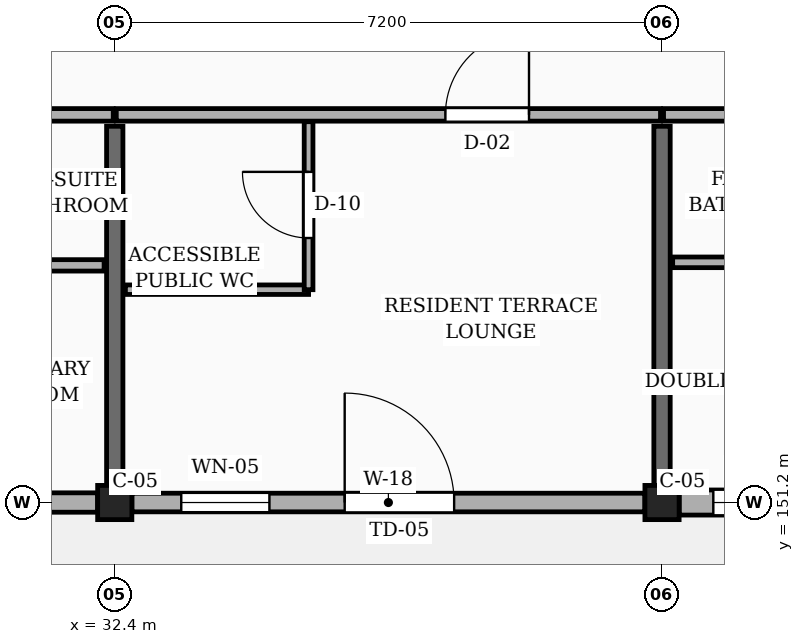
"""IFC4 building model, lengths in metres.
Left out: names, types, materials, properties, quantities, classifications, styles, units other than length and angle.
Written with IfcOpenShell. Run it as: python <this file> out.ifc"""

import sys

from ifc_helpers import new_model, si_unit, direction, frame, frame_2d, origin, origin_2d, place, context, subcontext, project, spatial, rectangle, extrude, element, fill, save


model = new_model("IFC4")
c1 = context("Model", 3, precision=1e-05, world=origin(), true_north=direction((0.0, 1.0)))
c2 = subcontext(c1, "Body", "Model", "MODEL_VIEW")
j1 = project(units=[si_unit("LENGTHUNIT", "METRE"), si_unit("PLANEANGLEUNIT", "RADIAN")], contexts=[c1])
p1 = place(None, origin())
s1 = spatial("IfcSite", under=j1, at=p1, CompositionType="ELEMENT")
p2 = place(p1, origin())
s2 = spatial("IfcBuilding", under=s1, at=p2, CompositionType="ELEMENT")
p3 = place(p2, frame((0.0, 0.0, 36.0)))
s3 = spatial("IfcBuildingStorey", under=s2, at=p3, CompositionType="ELEMENT", Elevation=36.0)
for number, where, z_axis, x_axis in (
    (1, (32.4, 151.2, 0.0), (0.0, 0.0, 1.0), (1.0, 0.0, 0.0)),
    (2, (39.6, 151.2, 0.0), (0.0, 0.0, 1.0), (1.0, 0.0, 0.0)),
):
    element("IfcColumn", number, at=place(p3, frame(where, z_axis=z_axis, x_axis=x_axis)), inside=s3, PredefinedType="COLUMN", context=c2, shape_type="SweptSolid", body=[
        extrude(rectangle(XDim=0.45, YDim=0.45, at=origin_2d()), origin(), (0.0, 0.0, 1.0), 3.15),
    ])
for number, where, z_axis, x_axis in (
    (3, (32.4, 151.425, 0.0), (0.0, 0.0, 1.0), (0.0, 1.0, 0.0)),
    (4, (39.6, 151.425, 0.0), (0.0, 0.0, 1.0), (0.0, 1.0, 0.0)),
):
    element("IfcWall", number, at=place(p3, frame(where, z_axis=z_axis, x_axis=x_axis)), inside=s3, PredefinedType="SOLIDWALL", context=c2, shape_type="SweptSolid", body=[
        extrude(rectangle(XDim=4.725, YDim=0.215, at=frame_2d((2.362, 0.0))), origin(), (0.0, 0.0, 1.0), 2.185),
    ])
p4 = place(p3, frame((25.425, 151.2, 0.0), z_axis=(0.0, 0.0, 1.0), x_axis=(1.0, 0.0, 0.0)))
e5 = element("IfcWall", 5, at=p4, inside=s3, PredefinedType="SOLIDWALL", context=c2, shape_type="SweptSolid", body=[
    extrude(rectangle(XDim=6.75, YDim=0.255, at=frame_2d((3.375, 0.0))), origin(), (0.0, 0.0, 1.0), 2.455),
])
p5 = place(p4, frame((0.45, 0.0, 0.78)))
e6 = element("IfcOpeningElement", 6, at=p5, cuts=e5, PredefinedType="OPENING", context=c2, shape_type="SweptSolid", body=[
    extrude(rectangle(XDim=1.0, YDim=1.15, at=frame_2d((0.5, 0.575))), frame((0.0, 0.137, 0.0), z_axis=(0.0, -1.0, 0.0), x_axis=(1.0, 0.0, 0.0)), (0.0, 0.0, 1.0), 0.275),
])
p6 = place(p4, frame((4.65, 0.0, 0.78)))
e7 = element("IfcOpeningElement", 7, at=p6, cuts=e5, PredefinedType="OPENING", context=c2, shape_type="SweptSolid", body=[
    extrude(rectangle(XDim=1.16, YDim=1.15, at=frame_2d((0.58, 0.575))), frame((0.0, 0.137, 0.0), z_axis=(0.0, -1.0, 0.0), x_axis=(1.0, 0.0, 0.0)), (0.0, 0.0, 1.0), 0.275),
])
p7 = place(p3, frame((32.625, 151.2, 0.0), z_axis=(0.0, 0.0, 1.0), x_axis=(1.0, 0.0, 0.0)))
e8 = element("IfcWall", 8, at=p7, inside=s3, PredefinedType="SOLIDWALL", context=c2, shape_type="SweptSolid", body=[
    extrude(rectangle(XDim=6.75, YDim=0.245, at=frame_2d((3.375, 0.0))), origin(), (0.0, 0.0, 1.0), 2.455),
])
p8 = place(p7, frame((2.8, 0.0, 0.0)))
e9 = element("IfcOpeningElement", 9, at=p8, cuts=e8, PredefinedType="OPENING", context=c2, shape_type="SweptSolid", body=[
    extrude(rectangle(XDim=1.44, YDim=2.12, at=frame_2d((0.72, 1.06))), frame((0.0, 0.133, 0.0), z_axis=(0.0, -1.0, 0.0), x_axis=(1.0, 0.0, 0.0)), (0.0, 0.0, 1.0), 0.265),
])
p9 = place(p7, frame((0.65, 0.0, 0.78)))
e10 = element("IfcOpeningElement", 10, at=p9, cuts=e8, PredefinedType="OPENING", context=c2, shape_type="SweptSolid", body=[
    extrude(rectangle(XDim=1.16, YDim=1.15, at=frame_2d((0.58, 0.575))), frame((0.0, 0.133, 0.0), z_axis=(0.0, -1.0, 0.0), x_axis=(1.0, 0.0, 0.0)), (0.0, 0.0, 1.0), 0.265),
])
p10 = place(p3, frame((39.825, 151.2, 0.0), z_axis=(0.0, 0.0, 1.0), x_axis=(1.0, 0.0, 0.0)))
e11 = element("IfcWall", 11, at=p10, inside=s3, PredefinedType="SOLIDWALL", context=c2, shape_type="SweptSolid", body=[
    extrude(rectangle(XDim=6.75, YDim=0.33, at=frame_2d((3.375, 0.0))), origin(), (0.0, 0.0, 1.0), 2.455),
])
p11 = place(p10, frame((0.45, 0.0, 0.78)))
e12 = element("IfcOpeningElement", 12, at=p11, cuts=e11, PredefinedType="OPENING", context=c2, shape_type="SweptSolid", body=[
    extrude(rectangle(XDim=1.24, YDim=1.15, at=frame_2d((0.62, 0.575))), frame((0.0, 0.175, 0.0), z_axis=(0.0, -1.0, 0.0), x_axis=(1.0, 0.0, 0.0)), (0.0, 0.0, 1.0), 0.35),
])
p12 = place(p10, frame((4.65, 0.0, 0.78)))
e13 = element("IfcOpeningElement", 13, at=p12, cuts=e11, PredefinedType="OPENING", context=c2, shape_type="SweptSolid", body=[
    extrude(rectangle(XDim=1.4, YDim=1.15, at=frame_2d((0.7, 0.575))), frame((0.0, 0.175, 0.0), z_axis=(0.0, -1.0, 0.0), x_axis=(1.0, 0.0, 0.0)), (0.0, 0.0, 1.0), 0.35),
])
p13 = place(p3, frame((25.22, 156.3, 0.0), z_axis=(0.0, 0.0, 1.0), x_axis=(1.0, 0.0, 0.0)))
e14 = element("IfcWall", 14, at=p13, inside=s3, PredefinedType="PARTITIONING", context=c2, shape_type="SweptSolid", body=[
    extrude(rectangle(XDim=7.16, YDim=0.165, at=frame_2d((3.58, 0.0))), origin(), (0.0, 0.0, 1.0), 2.32),
])
p14 = place(p13, frame((1.33, 0.0, 0.0)))
e15 = element("IfcOpeningElement", 15, at=p14, cuts=e14, PredefinedType="OPENING", context=c2, shape_type="SweptSolid", body=[
    extrude(rectangle(XDim=0.94, YDim=2.12, at=frame_2d((0.47, 1.06))), frame((0.0, 0.093, 0.0), z_axis=(0.0, -1.0, 0.0), x_axis=(1.0, 0.0, 0.0)), (0.0, 0.0, 1.0), 0.185),
])
p15 = place(p3, frame((32.42, 156.3, 0.0), z_axis=(0.0, 0.0, 1.0), x_axis=(1.0, 0.0, 0.0)))
e16 = element("IfcWall", 16, at=p15, inside=s3, PredefinedType="PARTITIONING", context=c2, shape_type="SweptSolid", body=[
    extrude(rectangle(XDim=7.16, YDim=0.165, at=frame_2d((3.58, 0.0))), origin(), (0.0, 0.0, 1.0), 2.32),
])
p16 = place(p15, frame((4.33, 0.0, 0.0)))
e17 = element("IfcOpeningElement", 17, at=p16, cuts=e16, PredefinedType="OPENING", context=c2, shape_type="SweptSolid", body=[
    extrude(rectangle(XDim=1.1, YDim=2.15, at=frame_2d((0.55, 1.075))), frame((0.0, 0.093, 0.0), z_axis=(0.0, -1.0, 0.0), x_axis=(1.0, 0.0, 0.0)), (0.0, 0.0, 1.0), 0.185),
])
p17 = place(p3, frame((39.62, 156.3, 0.0), z_axis=(0.0, 0.0, 1.0), x_axis=(1.0, 0.0, 0.0)))
e18 = element("IfcWall", 18, at=p17, inside=s3, PredefinedType="PARTITIONING", context=c2, shape_type="SweptSolid", body=[
    extrude(rectangle(XDim=7.16, YDim=0.165, at=frame_2d((3.58, 0.0))), origin(), (0.0, 0.0, 1.0), 2.32),
])
p18 = place(p17, frame((4.78, 0.0, 0.0)))
e19 = element("IfcOpeningElement", 19, at=p18, cuts=e18, PredefinedType="OPENING", context=c2, shape_type="SweptSolid", body=[
    extrude(rectangle(XDim=1.0, YDim=2.15, at=frame_2d((0.5, 1.075))), frame((0.0, 0.093, 0.0), z_axis=(0.0, -1.0, 0.0), x_axis=(1.0, 0.0, 0.0)), (0.0, 0.0, 1.0), 0.185),
])
p19 = place(p3, frame((25.34, 154.32, 0.0), z_axis=(0.0, 0.0, 1.0), x_axis=(1.0, 0.0, 0.0)))
e20 = element("IfcWall", 20, at=p19, inside=s3, PredefinedType="PARTITIONING", context=c2, shape_type="SweptSolid", body=[
    extrude(rectangle(XDim=6.92, YDim=0.15, at=frame_2d((3.46, 0.0))), origin(), (0.0, 0.0, 1.0), 2.32),
])
p20 = place(p19, frame((1.31, 0.0, 0.0)))
e21 = element("IfcOpeningElement", 21, at=p20, cuts=e20, PredefinedType="OPENING", context=c2, shape_type="SweptSolid", body=[
    extrude(rectangle(XDim=0.95, YDim=2.1, at=frame_2d((0.475, 1.05))), frame((0.0, 0.085, 0.0), z_axis=(0.0, -1.0, 0.0), x_axis=(1.0, 0.0, 0.0)), (0.0, 0.0, 1.0), 0.17),
])
p21 = place(p3, frame((32.54, 154.0, 0.0), z_axis=(0.0, 0.0, 1.0), x_axis=(1.0, 0.0, 0.0)))
e22 = element("IfcWall", 22, at=p21, inside=s3, PredefinedType="PARTITIONING", context=c2, shape_type="SweptSolid", body=[
    extrude(rectangle(XDim=2.41, YDim=0.125, at=frame_2d((1.205, 0.0))), origin(), (0.0, 0.0, 1.0), 2.32),
])
p22 = place(p3, frame((34.95, 154.0, 0.0), z_axis=(0.0, 0.0, 1.0), x_axis=(0.0, 1.0, 0.0)))
e23 = element("IfcWall", 23, at=p22, inside=s3, PredefinedType="PARTITIONING", context=c2, shape_type="SweptSolid", body=[
    extrude(rectangle(XDim=2.21, YDim=0.115, at=frame_2d((1.105, 0.0))), origin(), (0.0, 0.0, 1.0), 2.32),
])
p23 = place(p22, frame((0.68, 0.0, 0.0)))
e24 = element("IfcOpeningElement", 24, at=p23, cuts=e23, PredefinedType="OPENING", context=c2, shape_type="SweptSolid", body=[
    extrude(rectangle(XDim=0.87, YDim=2.05, at=frame_2d((0.435, 1.025))), frame((0.0, 0.067, 0.0), z_axis=(0.0, -1.0, 0.0), x_axis=(1.0, 0.0, 0.0)), (0.0, 0.0, 1.0), 0.135),
])
p24 = place(p3, frame((39.74, 154.36, 0.0), z_axis=(0.0, 0.0, 1.0), x_axis=(1.0, 0.0, 0.0)))
e25 = element("IfcWall", 25, at=p24, inside=s3, PredefinedType="PARTITIONING", context=c2, shape_type="SweptSolid", body=[
    extrude(rectangle(XDim=6.92, YDim=0.14, at=frame_2d((3.46, 0.0))), origin(), (0.0, 0.0, 1.0), 2.32),
])
p25 = place(p24, frame((4.66, 0.0, 0.0)))
e26 = element("IfcOpeningElement", 26, at=p25, cuts=e25, PredefinedType="OPENING", context=c2, shape_type="SweptSolid", body=[
    extrude(rectangle(XDim=0.92, YDim=2.1, at=frame_2d((0.46, 1.05))), frame((0.0, 0.08, 0.0), z_axis=(0.0, -1.0, 0.0), x_axis=(1.0, 0.0, 0.0)), (0.0, 0.0, 1.0), 0.16),
])
p26 = place(p8, frame((1.44, 0.0, 0.0), z_axis=(0.0, 0.0, 1.0), x_axis=(-1.0, 0.0, 0.0)))
e27 = element("IfcDoor", 27, at=p26, inside=s3, OperationType="SINGLE_SWING_LEFT", PredefinedType="DOOR", context=c2, shape_type="SweptSolid", body=[
    extrude(rectangle(XDim=1.44, YDim=2.12, at=frame_2d((0.72, 1.06))), frame((0.0, 0.025, 0.0), z_axis=(0.0, -1.0, 0.0), x_axis=(1.0, 0.0, 0.0)), (0.0, 0.0, 1.0), 0.05),
])
fill(e9, e27)
p27 = place(p9, origin())
e28 = element("IfcWindow", 28, at=p27, inside=s3, PartitioningType="SINGLE_PANEL", PredefinedType="WINDOW", context=c2, shape_type="SweptSolid", body=[
    extrude(rectangle(XDim=1.16, YDim=1.15, at=frame_2d((0.58, 0.575))), frame((0.0, 0.03, 0.0), z_axis=(0.0, -1.0, 0.0), x_axis=(1.0, 0.0, 0.0)), (0.0, 0.0, 1.0), 0.06),
])
fill(e10, e28)
p28 = place(p11, origin())
e29 = element("IfcWindow", 29, at=p28, inside=s3, PartitioningType="SINGLE_PANEL", PredefinedType="WINDOW", context=c2, shape_type="SweptSolid", body=[
    extrude(rectangle(XDim=1.24, YDim=1.15, at=frame_2d((0.62, 0.575))), frame((0.0, 0.03, 0.0), z_axis=(0.0, -1.0, 0.0), x_axis=(1.0, 0.0, 0.0)), (0.0, 0.0, 1.0), 0.06),
])
fill(e12, e29)
p29 = place(p16, origin())
e30 = element("IfcDoor", 30, at=p29, inside=s3, OperationType="SINGLE_SWING_RIGHT", PredefinedType="DOOR", context=c2, shape_type="SweptSolid", body=[
    extrude(rectangle(XDim=1.1, YDim=2.15, at=frame_2d((0.55, 1.075))), frame((0.0, 0.025, 0.0), z_axis=(0.0, -1.0, 0.0), x_axis=(1.0, 0.0, 0.0)), (0.0, 0.0, 1.0), 0.05),
])
fill(e17, e30)
p30 = place(p23, origin())
e31 = element("IfcDoor", 31, at=p30, inside=s3, OperationType="SINGLE_SWING_RIGHT", PredefinedType="DOOR", context=c2, shape_type="SweptSolid", body=[
    extrude(rectangle(XDim=0.87, YDim=2.05, at=frame_2d((0.435, 1.025))), frame((0.0, 0.025, 0.0), z_axis=(0.0, -1.0, 0.0), x_axis=(1.0, 0.0, 0.0)), (0.0, 0.0, 1.0), 0.05),
])
fill(e24, e31)
save(model, sys.argv[1])
